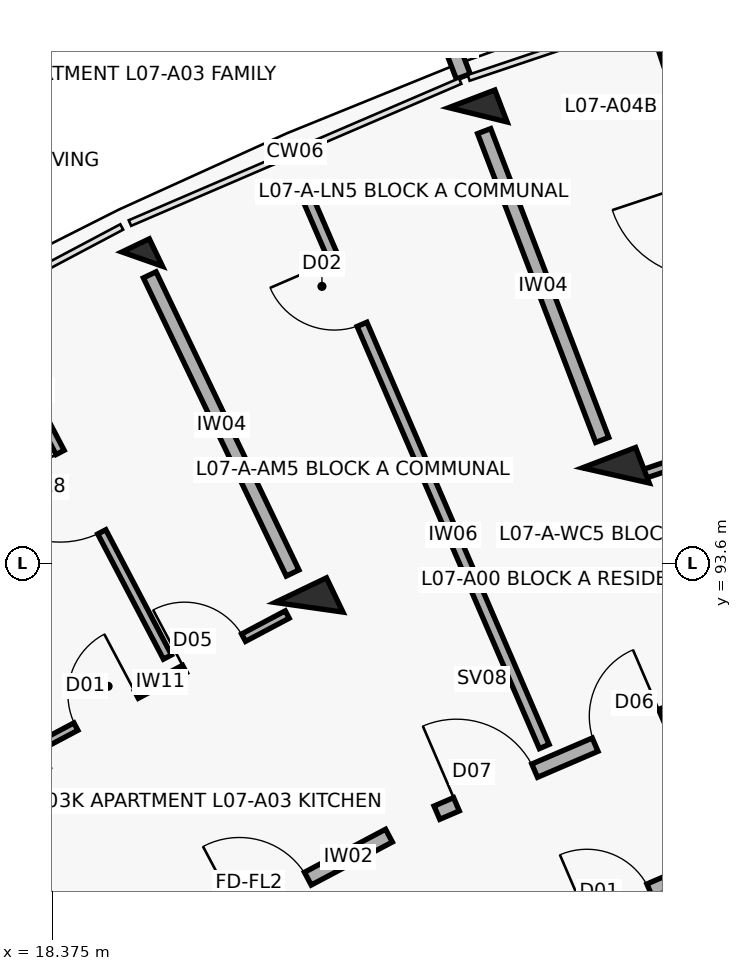
"""IFC4 building model, lengths in metres.
Left out: names, types, materials, properties, quantities, classifications, styles, units other than length and angle.
Written with IfcOpenShell. Run it as: python <this file> out.ifc"""

import sys

from ifc_helpers import new_model, si_unit, direction, frame, frame_2d, origin, origin_2d, place, context, subcontext, project, spatial, rectangle, extrude, element, fill, save


model = new_model("IFC4")
c1 = context("Model", 3, precision=1e-05, world=origin(), true_north=direction((0.0, 1.0)))
c2 = subcontext(c1, "Body", "Model", "MODEL_VIEW")
j1 = project(units=[si_unit("LENGTHUNIT", "METRE"), si_unit("PLANEANGLEUNIT", "RADIAN")], contexts=[c1])
p1 = place(None, origin())
s1 = spatial("IfcSite", under=j1, at=p1, CompositionType="ELEMENT")
p2 = place(p1, origin())
s2 = spatial("IfcBuilding", under=s1, at=p2, CompositionType="ELEMENT")
p3 = place(p2, frame((0.0, 0.0, 23.6)))
s3 = spatial("IfcBuildingStorey", under=s2, at=p3, CompositionType="ELEMENT", Elevation=23.6)
p4 = place(p3, frame((21.754, 93.019, 0.0), z_axis=(0.0, 0.0, 1.0), x_axis=(-0.432085748802, 0.901832526405, 0.0)))
e1 = element("IfcColumn", 1, at=p4, inside=s3, PredefinedType="COLUMN", context=c2, shape_type="SweptSolid", body=[
    extrude(rectangle(XDim=0.5, YDim=0.75, at=origin_2d()), origin(), (0.0, 0.0, 1.0), 3.1),
])
p5 = place(p3, frame((19.559, 97.6, 0.0), z_axis=(0.0, 0.0, 1.0), x_axis=(-0.432085748802, 0.901832526405, 0.0)))
e2 = element("IfcColumn", 2, at=p5, inside=s3, PredefinedType="COLUMN", context=c2, shape_type="SweptSolid", body=[
    extrude(rectangle(XDim=0.4, YDim=0.4, at=origin_2d()), origin(), (0.0, 0.0, 1.0), 3.1),
])
p6 = place(p3, frame((25.79, 94.753, 0.0), z_axis=(0.0, 0.0, 1.0), x_axis=(-0.357064076459, 0.934079892355, 0.0)))
e3 = element("IfcColumn", 3, at=p6, inside=s3, PredefinedType="COLUMN", context=c2, shape_type="SweptSolid", body=[
    extrude(rectangle(XDim=0.5, YDim=0.75, at=origin_2d()), origin(), (0.0, 0.0, 1.0), 3.1),
])
p7 = place(p3, frame((23.976, 99.499, 0.0), z_axis=(0.0, 0.0, 1.0), x_axis=(-0.357064076459, 0.934079892355, 0.0)))
e4 = element("IfcColumn", 4, at=p7, inside=s3, PredefinedType="COLUMN", context=c2, shape_type="SweptSolid", body=[
    extrude(rectangle(XDim=0.45, YDim=0.65, at=origin_2d()), origin(), (0.0, 0.0, 1.0), 3.1),
])
p8 = place(p3, frame((23.783, 100.003, 0.0), z_axis=(0.0, 0.0, 1.0), x_axis=(-0.356942580168, 0.934126326823, 0.0)))
e5 = element("IfcWall", 5, at=p8, inside=s3, PredefinedType="PARAPET", context=c2, shape_type="SweptSolid", body=[
    extrude(rectangle(XDim=0.9, YDim=0.195, at=frame_2d((0.45, 0.0))), origin(), (0.0, 0.0, 1.0), 2.25),
])
p9 = place(p3, frame((19.77, 88.404, 0.0), z_axis=(0.0, 0.0, 1.0), x_axis=(0.883410853063, 0.468599258099, 0.0)))
e6 = element("IfcWall", 6, at=p9, inside=s3, PredefinedType="SOLIDWALL", context=c2, shape_type="SweptSolid", body=[
    extrude(rectangle(XDim=3.436, YDim=0.19, at=frame_2d((1.718, 0.0))), origin(), (0.0, 0.0, 1.0), 2.08),
])
p10 = place(p9, frame((1.208, 0.0, 0.0)))
e7 = element("IfcOpeningElement", 7, at=p10, cuts=e6, PredefinedType="OPENING", context=c2, shape_type="SweptSolid", body=[
    extrude(rectangle(XDim=1.02, YDim=2.15, at=frame_2d((0.51, 1.075))), frame((0.0, 0.105, 0.0), z_axis=(0.0, -1.0, 0.0), x_axis=(1.0, 0.0, 0.0)), (0.0, 0.0, 1.0), 0.21),
])
p11 = place(p3, frame((18.113, 91.144, 0.0), z_axis=(0.0, 0.0, 1.0), x_axis=(0.88341855112, 0.46858474531, 0.0)))
e8 = element("IfcWall", 8, at=p11, inside=s3, PredefinedType="PARTITIONING", context=c2, shape_type="SweptSolid", body=[
    extrude(rectangle(XDim=3.797, YDim=0.11, at=frame_2d((1.898, 0.0))), origin(), (0.0, 0.0, 1.0), 2.08),
])
p12 = place(p11, frame((0.65, 0.0, 0.0)))
e9 = element("IfcOpeningElement", 9, at=p12, cuts=e8, PredefinedType="OPENING", context=c2, shape_type="SweptSolid", body=[
    extrude(rectangle(XDim=0.9, YDim=2.1, at=frame_2d((0.45, 1.05))), frame((0.0, 0.065, 0.0), z_axis=(0.0, -1.0, 0.0), x_axis=(1.0, 0.0, 0.0)), (0.0, 0.0, 1.0), 0.13),
])
p13 = place(p11, frame((2.267, 0.0, 0.0)))
e10 = element("IfcOpeningElement", 10, at=p13, cuts=e8, PredefinedType="OPENING", context=c2, shape_type="SweptSolid", body=[
    extrude(rectangle(XDim=0.88, YDim=2.1, at=frame_2d((0.44, 1.05))), frame((0.0, 0.065, 0.0), z_axis=(0.0, -1.0, 0.0), x_axis=(1.0, 0.0, 0.0)), (0.0, 0.0, 1.0), 0.13),
])
p14 = place(p3, frame((19.891, 92.364, 0.0), z_axis=(0.0, 0.0, 1.0), x_axis=(-0.464567298878, 0.885537816704, 0.0)))
e11 = element("IfcWall", 11, at=p14, inside=s3, PredefinedType="PARTITIONING", context=c2, shape_type="SweptSolid", body=[
    extrude(rectangle(XDim=4.9, YDim=0.12, at=frame_2d((2.45, 0.0))), origin(), (0.0, 0.0, 1.0), 2.08),
])
p15 = place(p14, frame((1.86, 0.0, 0.0)))
e12 = element("IfcOpeningElement", 12, at=p15, cuts=e11, PredefinedType="OPENING", context=c2, shape_type="SweptSolid", body=[
    extrude(rectangle(XDim=1.18, YDim=2.1, at=frame_2d((0.59, 1.05))), frame((0.0, 0.07, 0.0), z_axis=(0.0, -1.0, 0.0), x_axis=(1.0, 0.0, 0.0)), (0.0, 0.0, 1.0), 0.14),
])
p16 = place(p3, frame((23.437, 90.316, 0.0), z_axis=(0.0, 0.0, 1.0), x_axis=(0.918718172399, 0.394913813008, 0.0)))
e13 = element("IfcWall", 13, at=p16, inside=s3, PredefinedType="SOLIDWALL", context=c2, shape_type="SweptSolid", body=[
    extrude(rectangle(XDim=3.436, YDim=0.19, at=frame_2d((1.718, 0.0))), origin(), (0.0, 0.0, 1.0), 2.08),
])
p17 = place(p16, frame((0.28, 0.0, 0.0)))
e14 = element("IfcOpeningElement", 14, at=p17, cuts=e13, PredefinedType="OPENING", context=c2, shape_type="SweptSolid", body=[
    extrude(rectangle(XDim=1.12, YDim=2.15, at=frame_2d((0.56, 1.075))), frame((0.0, 0.105, 0.0), z_axis=(0.0, -1.0, 0.0), x_axis=(1.0, 0.0, 0.0)), (0.0, 0.0, 1.0), 0.21),
])
p18 = place(p16, frame((2.266, 0.0, 0.0)))
e15 = element("IfcOpeningElement", 15, at=p18, cuts=e13, PredefinedType="OPENING", context=c2, shape_type="SweptSolid", body=[
    extrude(rectangle(XDim=0.95, YDim=2.1, at=frame_2d((0.475, 1.05))), frame((0.0, 0.105, 0.0), z_axis=(0.0, -1.0, 0.0), x_axis=(1.0, 0.0, 0.0)), (0.0, 0.0, 1.0), 0.21),
])
p19 = place(p3, frame((24.322, 88.467, 0.0), z_axis=(0.0, 0.0, 1.0), x_axis=(0.918723391052, 0.394901672235, 0.0)))
e16 = element("IfcWall", 16, at=p19, inside=s3, PredefinedType="SOLIDWALL", context=c2, shape_type="SweptSolid", body=[
    extrude(rectangle(XDim=3.269, YDim=0.19, at=frame_2d((1.634, 0.0))), origin(), (0.0, 0.0, 1.0), 2.08),
])
p20 = place(p19, frame((1.184, 0.0, 0.0)))
e17 = element("IfcOpeningElement", 17, at=p20, cuts=e16, PredefinedType="OPENING", context=c2, shape_type="SweptSolid", body=[
    extrude(rectangle(XDim=0.9, YDim=2.1, at=frame_2d((0.45, 1.05))), frame((0.0, 0.105, 0.0), z_axis=(0.0, -1.0, 0.0), x_axis=(1.0, 0.0, 0.0)), (0.0, 0.0, 1.0), 0.21),
])
p21 = place(p3, frame((24.849, 91.187, 0.0), z_axis=(0.0, 0.0, 1.0), x_axis=(-0.396278945437, 0.91813016365, 0.0)))
e18 = element("IfcWall", 18, at=p21, inside=s3, PredefinedType="PARTITIONING", context=c2, shape_type="SweptSolid", body=[
    extrude(rectangle(XDim=7.95, YDim=0.14, at=frame_2d((3.975, 0.0))), origin(), (0.0, 0.0, 1.0), 2.08),
])
p22 = place(p21, frame((6.05, 0.0, 0.0)))
e19 = element("IfcOpeningElement", 19, at=p22, cuts=e18, PredefinedType="OPENING", context=c2, shape_type="SweptSolid", body=[
    extrude(rectangle(XDim=0.92, YDim=2.1, at=frame_2d((0.46, 1.05))), frame((0.0, 0.08, 0.0), z_axis=(0.0, -1.0, 0.0), x_axis=(1.0, 0.0, 0.0)), (0.0, 0.0, 1.0), 0.16),
])
p23 = place(p3, frame((21.538, 93.469, 0.0), z_axis=(0.0, 0.0, 1.0), x_axis=(-0.432086898897, 0.901831975371, 0.0)))
e20 = element("IfcWall", 20, at=p23, inside=s3, PredefinedType="SOLIDWALL", context=c2, shape_type="SweptSolid", body=[
    extrude(rectangle(XDim=4.35, YDim=0.185, at=frame_2d((2.175, 0.0))), origin(), (0.0, 0.0, 1.0), 2.08),
])
p24 = place(p3, frame((26.11, 94.756, 0.0), z_axis=(0.0, 0.0, 1.0), x_axis=(0.947873924847, 0.318645606584, 0.0)))
e21 = element("IfcWall", 21, at=p24, inside=s3, PredefinedType="PARTITIONING", context=c2, shape_type="SweptSolid", body=[
    extrude(rectangle(XDim=3.785, YDim=0.12, at=frame_2d((1.893, 0.0))), origin(), (0.0, 0.0, 1.0), 2.08),
])
p25 = place(p24, frame((0.65, 0.0, 0.0)))
e22 = element("IfcOpeningElement", 22, at=p25, cuts=e21, PredefinedType="OPENING", context=c2, shape_type="SweptSolid", body=[
    extrude(rectangle(XDim=0.9, YDim=2.1, at=frame_2d((0.45, 1.05))), frame((0.0, 0.07, 0.0), z_axis=(0.0, -1.0, 0.0), x_axis=(1.0, 0.0, 0.0)), (0.0, 0.0, 1.0), 0.14),
])
p26 = place(p24, frame((2.255, 0.0, 0.0)))
e23 = element("IfcOpeningElement", 23, at=p26, cuts=e21, PredefinedType="OPENING", context=c2, shape_type="SweptSolid", body=[
    extrude(rectangle(XDim=0.88, YDim=2.1, at=frame_2d((0.44, 1.05))), frame((0.0, 0.07, 0.0), z_axis=(0.0, -1.0, 0.0), x_axis=(1.0, 0.0, 0.0)), (0.0, 0.0, 1.0), 0.14),
])
p27 = place(p3, frame((27.98, 95.642, 0.0), z_axis=(0.0, 0.0, 1.0), x_axis=(-0.315749098291, 0.948842719806, 0.0)))
e24 = element("IfcWall", 24, at=p27, inside=s3, PredefinedType="PARTITIONING", context=c2, shape_type="SweptSolid", body=[
    extrude(rectangle(XDim=5.05, YDim=0.12, at=frame_2d((2.525, 0.0))), origin(), (0.0, 0.0, 1.0), 2.08),
])
p28 = place(p27, frame((1.875, 0.0, 0.0)))
e25 = element("IfcOpeningElement", 25, at=p28, cuts=e24, PredefinedType="OPENING", context=c2, shape_type="SweptSolid", body=[
    extrude(rectangle(XDim=1.3, YDim=2.1, at=frame_2d((0.65, 1.05))), frame((0.0, 0.07, 0.0), z_axis=(0.0, -1.0, 0.0), x_axis=(1.0, 0.0, 0.0)), (0.0, 0.0, 1.0), 0.14),
])
p29 = place(p3, frame((25.611, 95.22, 0.0), z_axis=(0.0, 0.0, 1.0), x_axis=(-0.357064016205, 0.934079915388, 0.0)))
e26 = element("IfcWall", 26, at=p29, inside=s3, PredefinedType="SOLIDWALL", context=c2, shape_type="SweptSolid", body=[
    extrude(rectangle(XDim=4.35, YDim=0.185, at=frame_2d((2.175, 0.0))), origin(), (0.0, 0.0, 1.0), 2.08),
])
p30 = place(p10, origin())
e27 = element("IfcDoor", 27, at=p30, inside=s3, OperationType="SINGLE_SWING_LEFT", PredefinedType="DOOR", context=c2, shape_type="SweptSolid", body=[
    extrude(rectangle(XDim=1.02, YDim=2.15, at=frame_2d((0.51, 1.075))), frame((0.0, 0.025, 0.0), z_axis=(0.0, -1.0, 0.0), x_axis=(1.0, 0.0, 0.0)), (0.0, 0.0, 1.0), 0.05),
])
fill(e7, e27)
p31 = place(p12, origin())
e28 = element("IfcDoor", 28, at=p31, inside=s3, OperationType="SINGLE_SWING_RIGHT", PredefinedType="DOOR", context=c2, shape_type="SweptSolid", body=[
    extrude(rectangle(XDim=0.9, YDim=2.1, at=frame_2d((0.45, 1.05))), frame((0.0, 0.025, 0.0), z_axis=(0.0, -1.0, 0.0), x_axis=(1.0, 0.0, 0.0)), (0.0, 0.0, 1.0), 0.05),
])
fill(e9, e28)
p32 = place(p13, origin())
e29 = element("IfcDoor", 29, at=p32, inside=s3, OperationType="SINGLE_SWING_LEFT", PredefinedType="DOOR", context=c2, shape_type="SweptSolid", body=[
    extrude(rectangle(XDim=0.88, YDim=2.1, at=frame_2d((0.44, 1.05))), frame((0.0, 0.025, 0.0), z_axis=(0.0, -1.0, 0.0), x_axis=(1.0, 0.0, 0.0)), (0.0, 0.0, 1.0), 0.05),
])
fill(e10, e29)
p33 = place(p15, origin())
e30 = element("IfcDoor", 30, at=p33, inside=s3, OperationType="SINGLE_SWING_RIGHT", PredefinedType="DOOR", context=c2, shape_type="SweptSolid", body=[
    extrude(rectangle(XDim=1.18, YDim=2.1, at=frame_2d((0.59, 1.05))), frame((0.0, 0.025, 0.0), z_axis=(0.0, -1.0, 0.0), x_axis=(1.0, 0.0, 0.0)), (0.0, 0.0, 1.0), 0.05),
])
fill(e12, e30)
p34 = place(p17, origin())
e31 = element("IfcDoor", 31, at=p34, inside=s3, OperationType="SINGLE_SWING_LEFT", PredefinedType="DOOR", context=c2, shape_type="SweptSolid", body=[
    extrude(rectangle(XDim=1.12, YDim=2.15, at=frame_2d((0.56, 1.075))), frame((0.0, 0.025, 0.0), z_axis=(0.0, -1.0, 0.0), x_axis=(1.0, 0.0, 0.0)), (0.0, 0.0, 1.0), 0.05),
])
fill(e14, e31)
p35 = place(p18, origin())
e32 = element("IfcDoor", 32, at=p35, inside=s3, OperationType="SINGLE_SWING_RIGHT", PredefinedType="DOOR", context=c2, shape_type="SweptSolid", body=[
    extrude(rectangle(XDim=0.95, YDim=2.1, at=frame_2d((0.475, 1.05))), frame((0.0, 0.025, 0.0), z_axis=(0.0, -1.0, 0.0), x_axis=(1.0, 0.0, 0.0)), (0.0, 0.0, 1.0), 0.05),
])
fill(e15, e32)
p36 = place(p20, origin())
e33 = element("IfcDoor", 33, at=p36, inside=s3, OperationType="SINGLE_SWING_LEFT", PredefinedType="DOOR", context=c2, shape_type="SweptSolid", body=[
    extrude(rectangle(XDim=0.9, YDim=2.1, at=frame_2d((0.45, 1.05))), frame((0.0, 0.025, 0.0), z_axis=(0.0, -1.0, 0.0), x_axis=(1.0, 0.0, 0.0)), (0.0, 0.0, 1.0), 0.05),
])
fill(e17, e33)
p37 = place(p22, origin())
e34 = element("IfcDoor", 34, at=p37, inside=s3, OperationType="SINGLE_SWING_RIGHT", PredefinedType="DOOR", context=c2, shape_type="SweptSolid", body=[
    extrude(rectangle(XDim=0.92, YDim=2.1, at=frame_2d((0.46, 1.05))), frame((0.0, 0.025, 0.0), z_axis=(0.0, -1.0, 0.0), x_axis=(1.0, 0.0, 0.0)), (0.0, 0.0, 1.0), 0.05),
])
fill(e19, e34)
save(model, sys.argv[1])
